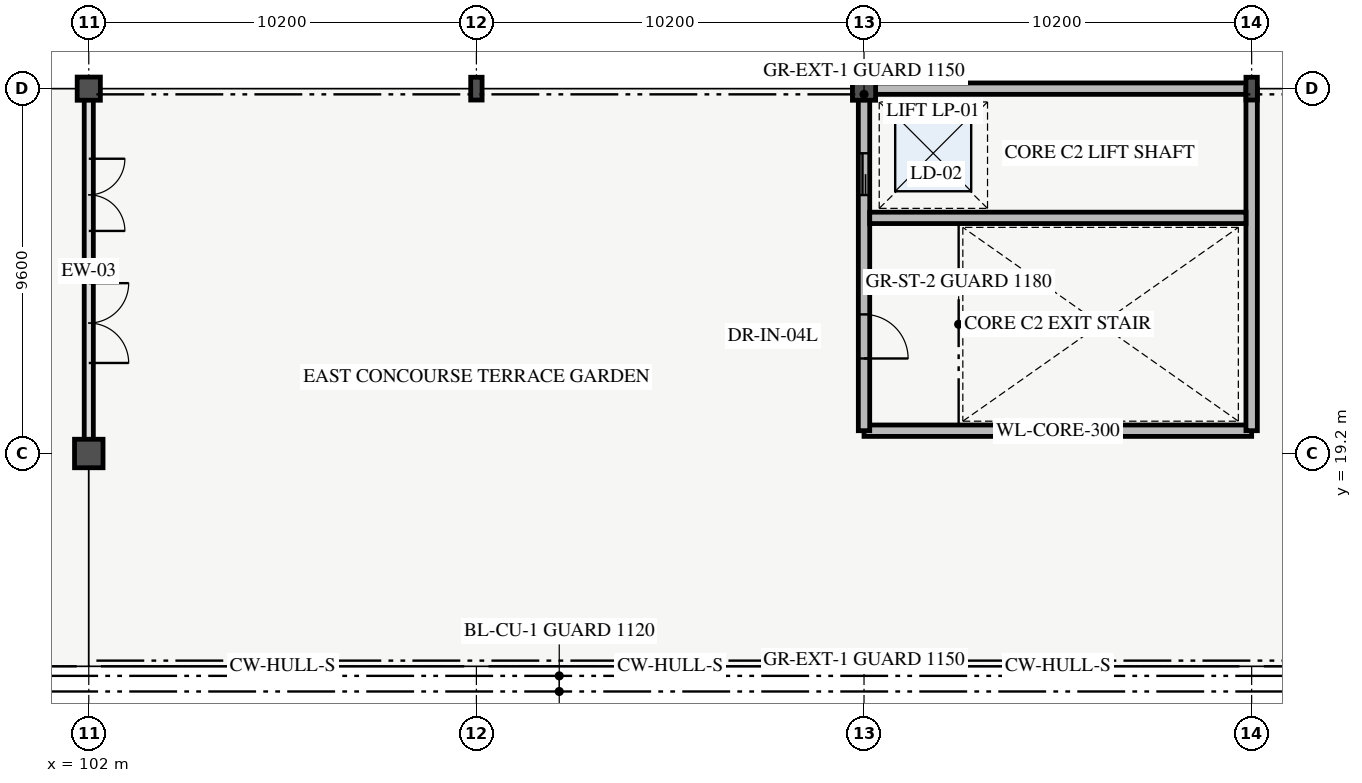
"""IFC4 building model, lengths in metres.
Left out: names, types, materials, properties, quantities, classifications, styles, units other than length and angle.
Written with IfcOpenShell. Run it as: python <this file> out.ifc"""

import sys

from ifc_helpers import new_model, si_unit, direction, frame, frame_2d, origin, origin_2d, place, context, subcontext, project, spatial, rectangle, hollow_circle, i_section, extrude, element, fill, save


model = new_model("IFC4")
c1 = context("Model", 3, precision=1e-05, world=origin(), true_north=direction((0.0, 1.0)))
c2 = subcontext(c1, "Body", "Model", "MODEL_VIEW")
j1 = project(units=[si_unit("LENGTHUNIT", "METRE"), si_unit("PLANEANGLEUNIT", "RADIAN")], contexts=[c1])
p1 = place(None, origin())
s1 = spatial("IfcSite", under=j1, at=p1, CompositionType="ELEMENT")
p2 = place(p1, origin())
s2 = spatial("IfcBuilding", under=s1, at=p2, CompositionType="ELEMENT")
p3 = place(p2, frame((0.0, 0.0, 10.8)))
s3 = spatial("IfcBuildingStorey", under=s2, at=p3, CompositionType="ELEMENT", Elevation=10.8)
p4 = place(p3, frame((102.0, 19.2, 0.0), z_axis=(0.0, 0.0, 1.0), x_axis=(1.0, 0.0, 0.0)))
e1 = element("IfcColumn", 1, at=p4, inside=s3, PredefinedType="COLUMN", context=c2, shape_type="SweptSolid", body=[
    extrude(rectangle(XDim=0.75, YDim=0.75, at=origin_2d()), origin(), (0.0, 0.0, 1.0), 4.2),
])
p5 = place(p3, frame((102.0, 28.8, 0.0), z_axis=(0.0, 0.0, 1.0), x_axis=(1.0, 0.0, 0.0)))
e2 = element("IfcColumn", 2, at=p5, inside=s3, PredefinedType="COLUMN", context=c2, shape_type="SweptSolid", body=[
    extrude(hollow_circle(Radius=0.305, WallThickness=0.025, at=origin_2d()), origin(), (0.0, 0.0, 1.0), 4.2),
])
p6 = place(p3, frame((112.2, 28.8, 0.0), z_axis=(0.0, 0.0, 1.0), x_axis=(1.0, 0.0, 0.0)))
e3 = element("IfcColumn", 3, at=p6, inside=s3, PredefinedType="COLUMN", context=c2, shape_type="SweptSolid", body=[
    extrude(i_section(OverallWidth=0.3, OverallDepth=0.6, WebThickness=0.015, FlangeThickness=0.03, FilletRadius=0.027, at=origin_2d()), origin(), (0.0, 0.0, 1.0), 4.2),
])
p7 = place(p3, frame((122.4, 28.8, 0.0), z_axis=(0.0, 0.0, 1.0), x_axis=(1.0, 0.0, 0.0)))
e4 = element("IfcColumn", 4, at=p7, inside=s3, PredefinedType="COLUMN", context=c2, shape_type="SweptSolid", body=[
    extrude(hollow_circle(Radius=0.305, WallThickness=0.025, at=origin_2d()), origin(), (0.0, 0.0, 1.0), 4.2),
])
p8 = place(p3, frame((132.6, 28.8, 0.0), z_axis=(0.0, 0.0, 1.0), x_axis=(1.0, 0.0, 0.0)))
e5 = element("IfcColumn", 5, at=p8, inside=s3, PredefinedType="COLUMN", context=c2, shape_type="SweptSolid", body=[
    extrude(i_section(OverallWidth=0.3, OverallDepth=0.6, WebThickness=0.015, FlangeThickness=0.03, FilletRadius=0.027, at=origin_2d()), origin(), (0.0, 0.0, 1.0), 4.2),
])
for number, where, z_axis, x_axis in (
    (6, (122.4, 19.8, 0.0), (0.0, 0.0, 1.0), (1.0, 0.0, 0.0)),
    (7, (122.4, 28.8, 0.0), (0.0, 0.0, 1.0), (1.0, 0.0, 0.0)),
):
    element("IfcWall", number, at=place(p3, frame(where, z_axis=z_axis, x_axis=x_axis)), inside=s3, PredefinedType="SHEAR", context=c2, shape_type="SweptSolid", body=[
        extrude(rectangle(XDim=10.2, YDim=0.3, at=frame_2d((5.1, 0.0))), origin(), (0.0, 0.0, 1.0), 4.2),
    ])
p9 = place(p3, frame((122.4, 19.8, 0.0), z_axis=(0.0, 0.0, 1.0), x_axis=(0.0, 1.0, 0.0)))
e8 = element("IfcWall", 8, at=p9, inside=s3, PredefinedType="SHEAR", context=c2, shape_type="SweptSolid", body=[
    extrude(rectangle(XDim=9.0, YDim=0.3, at=frame_2d((4.5, 0.0))), origin(), (0.0, 0.0, 1.0), 4.2),
])
p10 = place(p9, frame((1.9, 0.0, 0.0)))
e9 = element("IfcOpeningElement", 9, at=p10, cuts=e8, PredefinedType="OPENING", context=c2, shape_type="SweptSolid", body=[
    extrude(rectangle(XDim=1.16, YDim=2.2, at=frame_2d((0.58, 1.1))), frame((0.0, 0.16, 0.0), z_axis=(0.0, -1.0, 0.0), x_axis=(1.0, 0.0, 0.0)), (0.0, 0.0, 1.0), 0.32),
])
p11 = place(p9, frame((6.2, 0.0, 0.0)))
e10 = element("IfcOpeningElement", 10, at=p11, cuts=e8, PredefinedType="OPENING", context=c2, shape_type="SweptSolid", body=[
    extrude(rectangle(XDim=1.1, YDim=2.2, at=frame_2d((0.55, 1.1))), frame((0.0, 0.16, 0.0), z_axis=(0.0, -1.0, 0.0), x_axis=(1.0, 0.0, 0.0)), (0.0, 0.0, 1.0), 0.32),
])
p12 = place(p3, frame((132.6, 19.8, 0.0), z_axis=(0.0, 0.0, 1.0), x_axis=(0.0, 1.0, 0.0)))
e11 = element("IfcWall", 11, at=p12, inside=s3, PredefinedType="SHEAR", context=c2, shape_type="SweptSolid", body=[
    extrude(rectangle(XDim=9.0, YDim=0.3, at=frame_2d((4.5, 0.0))), origin(), (0.0, 0.0, 1.0), 4.2),
])
p13 = place(p3, frame((102.0, 19.44, 0.0), z_axis=(0.0, 0.0, 1.0), x_axis=(0.0, 1.0, 0.0)))
e12 = element("IfcWall", 12, at=p13, inside=s3, PredefinedType="STANDARD", context=c2, shape_type="SweptSolid", body=[
    extrude(rectangle(XDim=9.12, YDim=0.24, at=frame_2d((4.56, 0.0))), origin(), (0.0, 0.0, 1.0), 3.06),
])
p14 = place(p13, frame((2.142, 0.0, 0.0)))
e13 = element("IfcOpeningElement", 13, at=p14, cuts=e12, PredefinedType="OPENING", context=c2, shape_type="SweptSolid", body=[
    extrude(rectangle(XDim=2.1, YDim=2.3, at=frame_2d((1.05, 1.15))), frame((0.0, 0.13, 0.0), z_axis=(0.0, -1.0, 0.0), x_axis=(1.0, 0.0, 0.0)), (0.0, 0.0, 1.0), 0.26),
])
p15 = place(p13, frame((5.616, 0.0, 0.0)))
e14 = element("IfcOpeningElement", 14, at=p15, cuts=e12, PredefinedType="OPENING", context=c2, shape_type="SweptSolid", body=[
    extrude(rectangle(XDim=1.9, YDim=2.25, at=frame_2d((0.95, 1.125))), frame((0.0, 0.13, 0.0), z_axis=(0.0, -1.0, 0.0), x_axis=(1.0, 0.0, 0.0)), (0.0, 0.0, 1.0), 0.26),
])
p16 = place(p3, frame((122.55, 25.4, 0.0), z_axis=(0.0, 0.0, 1.0), x_axis=(1.0, 0.0, 0.0)))
e15 = element("IfcWall", 15, at=p16, inside=s3, PredefinedType="SHEAR", context=c2, shape_type="SweptSolid", body=[
    extrude(rectangle(XDim=9.9, YDim=0.3, at=frame_2d((4.95, 0.0))), origin(), (0.0, 0.0, 1.0), 4.2),
])
p17 = place(p14, frame((2.1, 0.0, 0.0), z_axis=(0.0, 0.0, 1.0), x_axis=(-1.0, 0.0, 0.0)))
e16 = element("IfcDoor", 16, at=p17, inside=s3, OperationType="DOUBLE_DOOR_SINGLE_SWING", PredefinedType="DOOR", context=c2, shape_type="SweptSolid", body=[
    extrude(rectangle(XDim=2.1, YDim=2.3, at=frame_2d((1.05, 1.15))), frame((0.0, 0.025, 0.0), z_axis=(0.0, -1.0, 0.0), x_axis=(1.0, 0.0, 0.0)), (0.0, 0.0, 1.0), 0.05),
])
fill(e13, e16)
p18 = place(p15, frame((1.9, 0.0, 0.0), z_axis=(0.0, 0.0, 1.0), x_axis=(-1.0, 0.0, 0.0)))
e17 = element("IfcDoor", 17, at=p18, inside=s3, OperationType="DOUBLE_DOOR_SINGLE_SWING", PredefinedType="DOOR", context=c2, shape_type="SweptSolid", body=[
    extrude(rectangle(XDim=1.9, YDim=2.25, at=frame_2d((0.95, 1.125))), frame((0.0, 0.025, 0.0), z_axis=(0.0, -1.0, 0.0), x_axis=(1.0, 0.0, 0.0)), (0.0, 0.0, 1.0), 0.05),
])
fill(e14, e17)
p19 = place(p10, origin())
e18 = element("IfcDoor", 18, at=p19, inside=s3, OperationType="SINGLE_SWING_LEFT", PredefinedType="DOOR", context=c2, shape_type="SweptSolid", body=[
    extrude(rectangle(XDim=1.16, YDim=2.2, at=frame_2d((0.58, 1.1))), frame((0.0, 0.025, 0.0), z_axis=(0.0, -1.0, 0.0), x_axis=(1.0, 0.0, 0.0)), (0.0, 0.0, 1.0), 0.05),
])
fill(e9, e18)
p20 = place(p11, origin())
e19 = element("IfcDoor", 19, at=p20, inside=s3, OperationType="SLIDING_TO_RIGHT", PredefinedType="DOOR", context=c2, shape_type="SweptSolid", body=[
    extrude(rectangle(XDim=1.1, YDim=2.2, at=frame_2d((0.55, 1.1))), frame((0.0, 0.025, 0.0), z_axis=(0.0, -1.0, 0.0), x_axis=(1.0, 0.0, 0.0)), (0.0, 0.0, 1.0), 0.05),
])
fill(e10, e19)
save(model, sys.argv[1])
